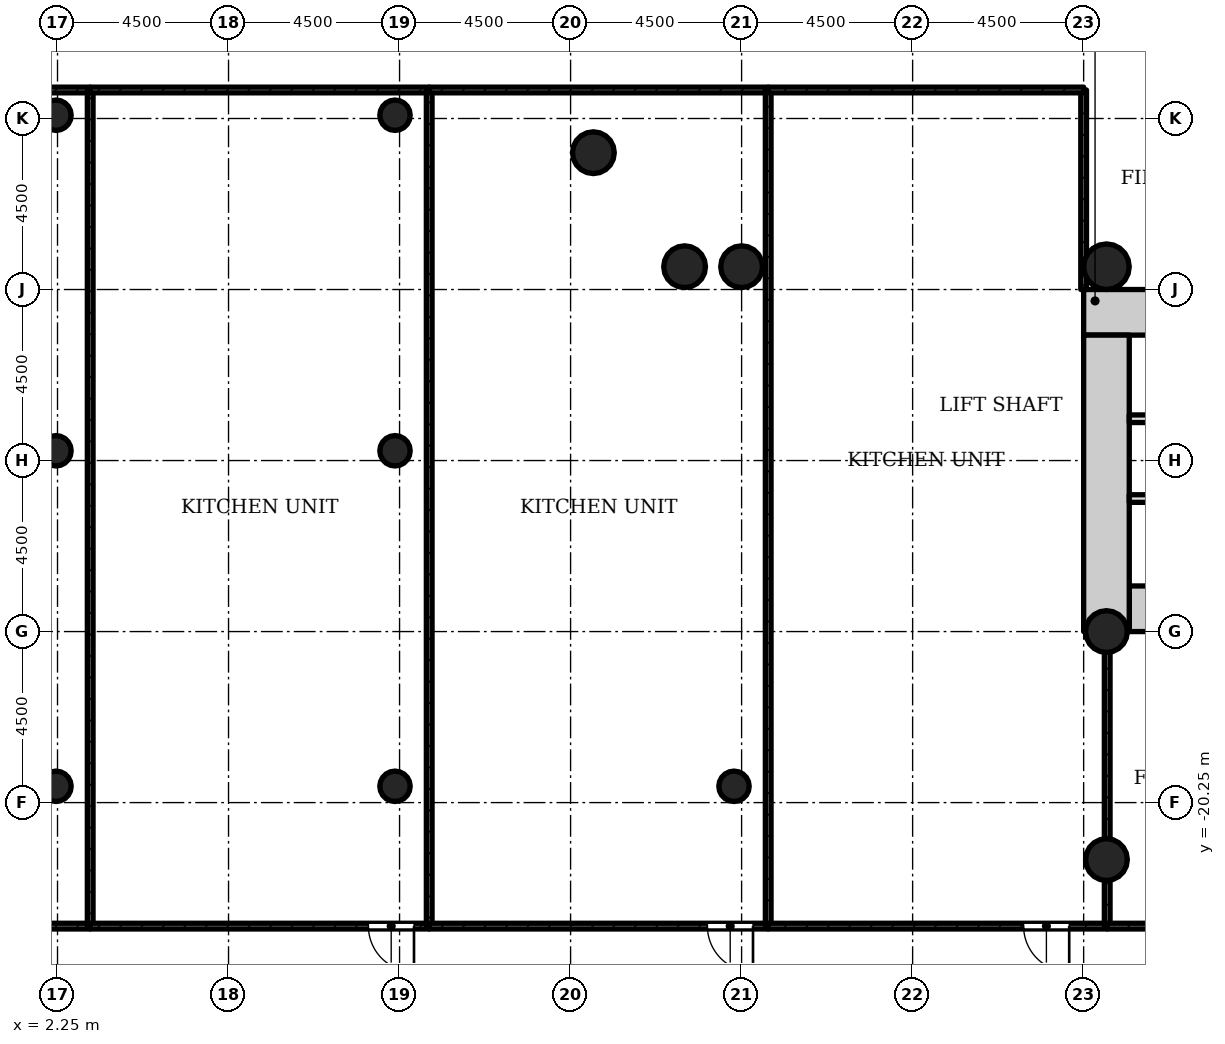
"""IFC4 building model, lengths in metres.
Left out: names, types, materials, properties, quantities, classifications, styles, units other than length and angle.
Written with IfcOpenShell. Run it as: python <this file> out.ifc"""

import sys

from ifc_helpers import new_model, si_unit, direction, frame, frame_2d, origin, origin_2d, place, context, subcontext, project, spatial, rectangle, hollow_circle, extrude, element, fill, save


model = new_model("IFC4")
c1 = context("Model", 3, precision=1e-05, world=origin(), true_north=direction((0.0, 1.0)))
c2 = subcontext(c1, "Body", "Model", "MODEL_VIEW")
j1 = project(units=[si_unit("LENGTHUNIT", "METRE"), si_unit("PLANEANGLEUNIT", "RADIAN")], contexts=[c1])
p1 = place(None, origin())
s1 = spatial("IfcSite", under=j1, at=p1, CompositionType="ELEMENT")
p2 = place(p1, origin())
s2 = spatial("IfcBuilding", under=s1, at=p2, CompositionType="ELEMENT")
p3 = place(p2, frame((0.0, 0.0, 6.0)))
s3 = spatial("IfcBuildingStorey", under=s2, at=p3, CompositionType="ELEMENT", Elevation=6.0)
p4 = place(p3, frame((30.45, -15.15, 0.0), z_axis=(0.0, 0.0, 1.0), x_axis=(1.0, 0.0, 0.0)))
e1 = element("IfcWall", 1, at=p4, inside=s3, PredefinedType="SHEAR", context=c2, shape_type="SweptSolid", body=[
    extrude(rectangle(XDim=12.3, YDim=1.2, at=frame_2d((6.15, 0.0))), origin(), (0.0, 0.0, 1.0), 5.0),
])
p5 = place(p4, frame((4.65, 0.0, 0.0)))
e2 = element("IfcOpeningElement", 2, at=p5, cuts=e1, PredefinedType="OPENING", context=c2, shape_type="SweptSolid", body=[
    extrude(rectangle(XDim=1.8, YDim=2.1, at=frame_2d((0.9, 1.05))), frame((0.0, 0.61, 0.0), z_axis=(0.0, -1.0, 0.0), x_axis=(1.0, 0.0, 0.0)), (0.0, 0.0, 1.0), 1.22),
])
p6 = place(p3, frame((41.55, -7.35, 0.0), z_axis=(0.0, 0.0, 1.0), x_axis=(-1.0, 0.0, 0.0)))
e3 = element("IfcWall", 3, at=p6, inside=s3, PredefinedType="SHEAR", context=c2, shape_type="SweptSolid", body=[
    extrude(rectangle(XDim=12.3, YDim=1.2, at=frame_2d((6.15, 0.0))), origin(), (0.0, 0.0, 1.0), 5.0),
])
p7 = place(p6, frame((4.65, 0.0, 0.0)))
e4 = element("IfcOpeningElement", 4, at=p7, cuts=e3, PredefinedType="OPENING", context=c2, shape_type="SweptSolid", body=[
    extrude(rectangle(XDim=1.8, YDim=2.1, at=frame_2d((0.9, 1.05))), frame((0.0, 0.61, 0.0), z_axis=(0.0, -1.0, 0.0), x_axis=(1.0, 0.0, 0.0)), (0.0, 0.0, 1.0), 1.22),
])
p8 = place(p3, frame((29.85, -7.95, 0.0), z_axis=(0.0, 0.0, 1.0), x_axis=(0.0, -1.0, 0.0)))
e5 = element("IfcWall", 5, at=p8, inside=s3, PredefinedType="SHEAR", context=c2, shape_type="SweptSolid", body=[
    extrude(rectangle(XDim=7.8, YDim=1.2, at=frame_2d((3.9, 0.0))), origin(), (0.0, 0.0, 1.0), 5.0),
])
for number, where, z_axis, x_axis in (
    (6, (20.25, -6.15, 0.0), (0.0, 0.0, 1.0), (1.0, 0.0, 0.0)),
    (7, (18.75, -6.15, 0.0), (0.0, 0.0, 1.0), (1.0, 0.0, 0.0)),
    (8, (16.35, -3.15, 0.0), (0.0, 0.0, 1.0), (1.0, 0.0, 0.0)),
    (9, (29.85, -15.75, 0.0), (0.0, 0.0, 1.0), (1.0, 0.0, 0.0)),
    (10, (29.85, -21.75, 0.0), (0.0, 0.0, 1.0), (1.0, 0.0, 0.0)),
):
    element("IfcColumn", number, at=place(p3, frame(where, z_axis=z_axis, x_axis=x_axis)), inside=s3, PredefinedType="COLUMN", context=c2, shape_type="SweptSolid", body=[
        extrude(hollow_circle(Radius=0.55, WallThickness=0.04, at=origin_2d()), origin(), (0.0, 0.0, 1.0), 5.0),
    ])
p9 = place(p3, frame((29.85, -6.15, 0.0), z_axis=(0.0, 0.0, 1.0), x_axis=(1.0, 0.0, 0.0)))
e11 = element("IfcColumn", 11, at=p9, inside=s3, PredefinedType="COLUMN", context=c2, shape_type="SweptSolid", body=[
    extrude(hollow_circle(Radius=0.6, WallThickness=0.045, at=origin_2d()), origin(), (0.0, 0.0, 1.0), 5.0),
])
for number, where, z_axis, x_axis in (
    (12, (2.21, -19.821, 0.0), (0.0, 0.0, 1.0), (1.0, 0.0, 0.0)),
    (13, (11.13, -19.821, 0.0), (0.0, 0.0, 1.0), (1.0, 0.0, 0.0)),
    (14, (20.05, -19.821, 0.0), (0.0, 0.0, 1.0), (1.0, 0.0, 0.0)),
    (15, (2.21, -10.993, 0.0), (0.0, 0.0, 1.0), (1.0, 0.0, 0.0)),
    (16, (11.13, -10.993, 0.0), (0.0, 0.0, 1.0), (1.0, 0.0, 0.0)),
    (17, (2.21, -2.164, 0.0), (0.0, 0.0, 1.0), (1.0, 0.0, 0.0)),
    (18, (11.13, -2.164, 0.0), (0.0, 0.0, 1.0), (1.0, 0.0, 0.0)),
):
    element("IfcColumn", number, at=place(p3, frame(where, z_axis=z_axis, x_axis=x_axis)), inside=s3, PredefinedType="COLUMN", context=c2, shape_type="SweptSolid", body=[
        extrude(hollow_circle(Radius=0.4, WallThickness=0.028, at=origin_2d()), origin(), (0.0, 0.0, 1.0), 5.0),
    ])
for number, where, z_axis, x_axis in (
    (19, (30.45, -10.15, 0.0), (0.0, 0.0, 1.0), (1.0, 0.0, 0.0)),
    (20, (30.45, -12.25, 0.0), (0.0, 0.0, 1.0), (1.0, 0.0, 0.0)),
):
    element("IfcWall", number, at=place(p3, frame(where, z_axis=z_axis, x_axis=x_axis)), inside=s3, PredefinedType="SOLIDWALL", context=c2, shape_type="SweptSolid", body=[
        extrude(rectangle(XDim=3.65, YDim=0.2, at=frame_2d((1.825, 0.0))), origin(), (0.0, 0.0, 1.0), 4.58),
    ])
p10 = place(p3, frame((-5.81, -1.5, 0.0), z_axis=(0.0, 0.0, 1.0), x_axis=(1.0, 0.0, 0.0)))
e21 = element("IfcWall", 21, at=p10, inside=s3, PredefinedType="PARTITIONING", context=c2, shape_type="SweptSolid", body=[
    extrude(rectangle(XDim=8.92, YDim=0.15, at=frame_2d((4.46, 0.0))), origin(), (0.0, 0.0, 1.0), 4.58),
])
p11 = place(p10, frame((0.4, 0.0, 0.0)))
e22 = element("IfcOpeningElement", 22, at=p11, cuts=e21, PredefinedType="OPENING", context=c2, shape_type="SweptSolid", body=[
    extrude(rectangle(XDim=1.2, YDim=2.1, at=frame_2d((0.6, 1.05))), frame((0.0, 0.085, 0.0), z_axis=(0.0, -1.0, 0.0), x_axis=(1.0, 0.0, 0.0)), (0.0, 0.0, 1.0), 0.17),
])
p12 = place(p3, frame((3.11, -23.5, 0.0), z_axis=(0.0, 0.0, 1.0), x_axis=(-1.0, 0.0, 0.0)))
e23 = element("IfcWall", 23, at=p12, inside=s3, PredefinedType="PARTITIONING", context=c2, shape_type="SweptSolid", body=[
    extrude(rectangle(XDim=1.96, YDim=0.15, at=frame_2d((0.98, 0.0))), origin(), (0.0, 0.0, 1.0), 4.58),
])
p13 = place(p3, frame((3.11, -1.5, 0.0), z_axis=(0.0, 0.0, 1.0), x_axis=(0.0, -1.0, 0.0)))
e24 = element("IfcWall", 24, at=p13, inside=s3, PredefinedType="PARTITIONING", context=c2, shape_type="SweptSolid", body=[
    extrude(rectangle(XDim=22.0, YDim=0.15, at=frame_2d((11.0, 0.0))), origin(), (0.0, 0.0, 1.0), 4.58),
])
p14 = place(p3, frame((12.03, -23.5, 0.0), z_axis=(0.0, 0.0, 1.0), x_axis=(-1.0, 0.0, 0.0)))
e25 = element("IfcWall", 25, at=p14, inside=s3, PredefinedType="PARTITIONING", context=c2, shape_type="SweptSolid", body=[
    extrude(rectangle(XDim=8.92, YDim=0.15, at=frame_2d((4.46, 0.0))), origin(), (0.0, 0.0, 1.0), 4.58),
])
p15 = place(p14, frame((0.4, 0.0, 0.0)))
e26 = element("IfcOpeningElement", 26, at=p15, cuts=e25, PredefinedType="OPENING", context=c2, shape_type="SweptSolid", body=[
    extrude(rectangle(XDim=1.2, YDim=2.1, at=frame_2d((0.6, 1.05))), frame((0.0, 0.085, 0.0), z_axis=(0.0, -1.0, 0.0), x_axis=(1.0, 0.0, 0.0)), (0.0, 0.0, 1.0), 0.17),
])
p16 = place(p3, frame((3.11, -1.5, 0.0), z_axis=(0.0, 0.0, 1.0), x_axis=(1.0, 0.0, 0.0)))
e27 = element("IfcWall", 27, at=p16, inside=s3, PredefinedType="PARTITIONING", context=c2, shape_type="SweptSolid", body=[
    extrude(rectangle(XDim=8.92, YDim=0.15, at=frame_2d((4.46, 0.0))), origin(), (0.0, 0.0, 1.0), 4.58),
])
p17 = place(p3, frame((12.03, -1.5, 0.0), z_axis=(0.0, 0.0, 1.0), x_axis=(0.0, -1.0, 0.0)))
e28 = element("IfcWall", 28, at=p17, inside=s3, PredefinedType="PARTITIONING", context=c2, shape_type="SweptSolid", body=[
    extrude(rectangle(XDim=22.0, YDim=0.15, at=frame_2d((11.0, 0.0))), origin(), (0.0, 0.0, 1.0), 4.58),
])
p18 = place(p3, frame((20.95, -23.5, 0.0), z_axis=(0.0, 0.0, 1.0), x_axis=(-1.0, 0.0, 0.0)))
e29 = element("IfcWall", 29, at=p18, inside=s3, PredefinedType="PARTITIONING", context=c2, shape_type="SweptSolid", body=[
    extrude(rectangle(XDim=8.92, YDim=0.15, at=frame_2d((4.46, 0.0))), origin(), (0.0, 0.0, 1.0), 4.58),
])
p19 = place(p18, frame((0.4, 0.0, 0.0)))
e30 = element("IfcOpeningElement", 30, at=p19, cuts=e29, PredefinedType="OPENING", context=c2, shape_type="SweptSolid", body=[
    extrude(rectangle(XDim=1.2, YDim=2.1, at=frame_2d((0.6, 1.05))), frame((0.0, 0.085, 0.0), z_axis=(0.0, -1.0, 0.0), x_axis=(1.0, 0.0, 0.0)), (0.0, 0.0, 1.0), 0.17),
])
p20 = place(p3, frame((12.03, -1.5, 0.0), z_axis=(0.0, 0.0, 1.0), x_axis=(1.0, 0.0, 0.0)))
e31 = element("IfcWall", 31, at=p20, inside=s3, PredefinedType="PARTITIONING", context=c2, shape_type="SweptSolid", body=[
    extrude(rectangle(XDim=8.92, YDim=0.15, at=frame_2d((4.46, 0.0))), origin(), (0.0, 0.0, 1.0), 4.58),
])
p21 = place(p3, frame((20.95, -1.5, 0.0), z_axis=(0.0, 0.0, 1.0), x_axis=(0.0, -1.0, 0.0)))
e32 = element("IfcWall", 32, at=p21, inside=s3, PredefinedType="PARTITIONING", context=c2, shape_type="SweptSolid", body=[
    extrude(rectangle(XDim=22.0, YDim=0.15, at=frame_2d((11.0, 0.0))), origin(), (0.0, 0.0, 1.0), 4.58),
])
p22 = place(p3, frame((29.25, -1.5, 0.0), z_axis=(0.0, 0.0, 1.0), x_axis=(0.0, -1.0, 0.0)))
e33 = element("IfcWall", 33, at=p22, inside=s3, PredefinedType="PARTITIONING", context=c2, shape_type="SweptSolid", body=[
    extrude(rectangle(XDim=5.25, YDim=0.15, at=frame_2d((2.625, 0.0))), origin(), (0.0, 0.0, 1.0), 4.58),
])
p23 = place(p3, frame((29.87, -23.5, 0.0), z_axis=(0.0, 0.0, 1.0), x_axis=(-1.0, 0.0, 0.0)))
e34 = element("IfcWall", 34, at=p23, inside=s3, PredefinedType="PARTITIONING", context=c2, shape_type="SweptSolid", body=[
    extrude(rectangle(XDim=8.92, YDim=0.15, at=frame_2d((4.46, 0.0))), origin(), (0.0, 0.0, 1.0), 4.58),
])
p24 = place(p23, frame((1.0, 0.0, 0.0)))
e35 = element("IfcOpeningElement", 35, at=p24, cuts=e34, PredefinedType="OPENING", context=c2, shape_type="SweptSolid", body=[
    extrude(rectangle(XDim=1.2, YDim=2.1, at=frame_2d((0.6, 1.05))), frame((0.0, 0.085, 0.0), z_axis=(0.0, -1.0, 0.0), x_axis=(1.0, 0.0, 0.0)), (0.0, 0.0, 1.0), 0.17),
])
p25 = place(p3, frame((20.95, -1.5, 0.0), z_axis=(0.0, 0.0, 1.0), x_axis=(1.0, 0.0, 0.0)))
e36 = element("IfcWall", 36, at=p25, inside=s3, PredefinedType="PARTITIONING", context=c2, shape_type="SweptSolid", body=[
    extrude(rectangle(XDim=8.3, YDim=0.15, at=frame_2d((4.15, 0.0))), origin(), (0.0, 0.0, 1.0), 4.58),
])
p26 = place(p3, frame((29.87, -15.75, 0.0), z_axis=(0.0, 0.0, 1.0), x_axis=(0.0, -1.0, 0.0)))
e37 = element("IfcWall", 37, at=p26, inside=s3, PredefinedType="PARTITIONING", context=c2, shape_type="SweptSolid", body=[
    extrude(rectangle(XDim=7.75, YDim=0.15, at=frame_2d((3.875, 0.0))), origin(), (0.0, 0.0, 1.0), 4.58),
])
p27 = place(p3, frame((34.5, -23.5, 0.0), z_axis=(0.0, 0.0, 1.0), x_axis=(-1.0, 0.0, 0.0)))
e38 = element("IfcWall", 38, at=p27, inside=s3, PredefinedType="PARTITIONING", context=c2, shape_type="SweptSolid", body=[
    extrude(rectangle(XDim=4.63, YDim=0.15, at=frame_2d((2.315, 0.0))), origin(), (0.0, 0.0, 1.0), 4.58),
])
p28 = place(p15, origin())
e39 = element("IfcDoor", 39, at=p28, inside=s3, OperationType="SINGLE_SWING_RIGHT", PredefinedType="DOOR", context=c2, shape_type="SweptSolid", body=[
    extrude(rectangle(XDim=1.2, YDim=2.1, at=frame_2d((0.6, 1.05))), frame((0.0, 0.025, 0.0), z_axis=(0.0, -1.0, 0.0), x_axis=(1.0, 0.0, 0.0)), (0.0, 0.0, 1.0), 0.05),
])
fill(e26, e39)
p29 = place(p19, origin())
e40 = element("IfcDoor", 40, at=p29, inside=s3, OperationType="SINGLE_SWING_RIGHT", PredefinedType="DOOR", context=c2, shape_type="SweptSolid", body=[
    extrude(rectangle(XDim=1.2, YDim=2.1, at=frame_2d((0.6, 1.05))), frame((0.0, 0.025, 0.0), z_axis=(0.0, -1.0, 0.0), x_axis=(1.0, 0.0, 0.0)), (0.0, 0.0, 1.0), 0.05),
])
fill(e30, e40)
p30 = place(p24, origin())
e41 = element("IfcDoor", 41, at=p30, inside=s3, OperationType="SINGLE_SWING_RIGHT", PredefinedType="DOOR", context=c2, shape_type="SweptSolid", body=[
    extrude(rectangle(XDim=1.2, YDim=2.1, at=frame_2d((0.6, 1.05))), frame((0.0, 0.025, 0.0), z_axis=(0.0, -1.0, 0.0), x_axis=(1.0, 0.0, 0.0)), (0.0, 0.0, 1.0), 0.05),
])
fill(e35, e41)
save(model, sys.argv[1])
